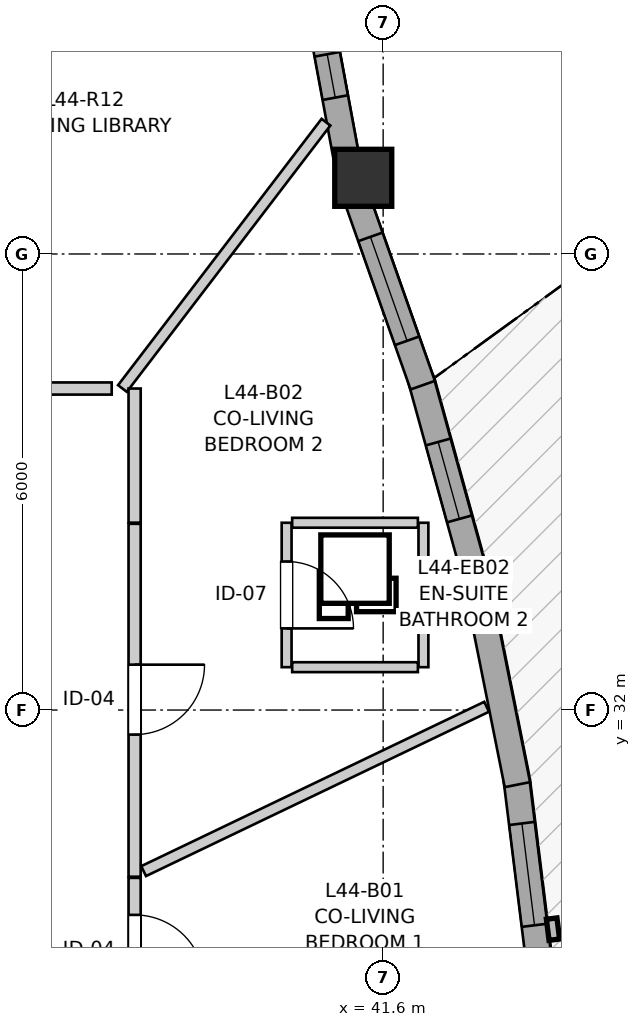
"""IFC4 building model, lengths in metres.
Left out: names, types, materials, properties, quantities, classifications, styles, units other than length and angle.
Written with IfcOpenShell. Run it as: python <this file> out.ifc"""

import sys

from ifc_helpers import new_model, si_unit, direction, frame, frame_2d, origin, origin_2d, place, context, subcontext, project, spatial, rectangle, i_section, extrude, source, transform, mapped, element, fill, save


model = new_model("IFC4")
c1 = context("Model", 3, precision=1e-05, world=origin(), true_north=direction((0.0, 1.0)))
c2 = subcontext(c1, "Body", "Model", "MODEL_VIEW")
j1 = project(units=[si_unit("LENGTHUNIT", "METRE"), si_unit("PLANEANGLEUNIT", "RADIAN")], contexts=[c1])
p1 = place(None, origin())
s1 = spatial("IfcSite", under=j1, at=p1, CompositionType="ELEMENT")
p2 = place(p1, origin())
s2 = spatial("IfcBuilding", under=s1, at=p2, CompositionType="ELEMENT")
p3 = place(p2, frame((0.0, 0.0, 149.0)))
s3 = spatial("IfcBuildingStorey", under=s2, at=p3, CompositionType="ELEMENT", Elevation=149.0)
m1 = source(origin(), c2, "Body", "SweptSolid", [
    extrude(i_section(OverallWidth=0.401, OverallDepth=0.399, WebThickness=0.023, FlangeThickness=0.036, FilletRadius=0.015, at=origin_2d()), origin(), (0.0, 0.0, 1.0), 2.935),
])
p4 = place(p3, frame((42.997, 33.729, 0.0), z_axis=(0.0, 0.0, 1.0), x_axis=(1.0, 0.0, 0.0)))
e1 = element("IfcColumn", 1, at=p4, inside=s3, PredefinedType="PILASTER", context=c2, shape_type="MappedRepresentation", body=[
    mapped(m1, transform((0.0, 0.0, 0.0), x_axis=(1.0, 0.0, 0.0), y_axis=(0.0, 1.0, 0.0), z_axis=(0.0, 0.0, 1.0), scale=1.0)),
])
m2 = source(origin(), c2, "Body", "SweptSolid", [
    extrude(rectangle(XDim=0.75, YDim=0.75, at=origin_2d()), origin(), (0.0, 0.0, 1.0), 2.935),
])
p5 = place(p3, frame((41.338, 39.002, 0.0), z_axis=(0.0, 0.0, 1.0), x_axis=(1.0, 0.0, 0.0)))
e2 = element("IfcColumn", 2, at=p5, inside=s3, PredefinedType="COLUMN", context=c2, shape_type="MappedRepresentation", body=[
    mapped(m2, transform((0.0, 0.0, 0.0), x_axis=(1.0, 0.0, 0.0), y_axis=(0.0, 1.0, 0.0), z_axis=(0.0, 0.0, 1.0), scale=1.0)),
])
p6 = place(p3, frame((43.664, 28.58, 0.0), z_axis=(0.0, 0.0, 1.0), x_axis=(-0.122794881762, 0.992432071737, 0.0)))
e3 = element("IfcWall", 3, at=p6, inside=s3, PredefinedType="SOLIDWALL", context=c2, shape_type="SweptSolid", body=[
    extrude(rectangle(XDim=2.545, YDim=0.34, at=frame_2d((1.272, 0.0))), origin(), (0.0, 0.0, 1.0), 2.515),
])
p7 = place(p6, frame((0.592, 0.0, 0.82)))
e4 = element("IfcOpeningElement", 4, at=p7, cuts=e3, PredefinedType="OPENING", context=c2, shape_type="SweptSolid", body=[
    extrude(rectangle(XDim=1.35, YDim=1.45, at=frame_2d((0.675, 0.725))), frame((0.0, 0.18, 0.0), z_axis=(0.0, -1.0, 0.0), x_axis=(1.0, 0.0, 0.0)), (0.0, 0.0, 1.0), 0.36),
])
p8 = place(p3, frame((43.366, 31.018, 0.0), z_axis=(0.0, 0.0, 1.0), x_axis=(-0.196116135138, 0.980580675691, 0.0)))
e5 = element("IfcWall", 5, at=p8, inside=s3, PredefinedType="SOLIDWALL", context=c2, shape_type="SweptSolid", body=[
    extrude(rectangle(XDim=2.71, YDim=0.34, at=frame_2d((1.355, 0.0))), origin(), (0.0, 0.0, 1.0), 2.515),
])
p9 = place(p3, frame((42.828, 33.703, 0.0), z_axis=(0.0, 0.0, 1.0), x_axis=(-0.266340796898, 0.963878923884, 0.0)))
e6 = element("IfcWall", 6, at=p9, inside=s3, PredefinedType="SOLIDWALL", context=c2, shape_type="SweptSolid", body=[
    extrude(rectangle(XDim=2.755, YDim=0.34, at=frame_2d((1.377, 0.0))), origin(), (0.0, 0.0, 1.0), 2.515),
])
p10 = place(p9, frame((0.842, 0.0, 0.82)))
e7 = element("IfcOpeningElement", 7, at=p10, cuts=e6, PredefinedType="OPENING", context=c2, shape_type="SweptSolid", body=[
    extrude(rectangle(XDim=1.05, YDim=1.45, at=frame_2d((0.525, 0.725))), frame((0.0, 0.18, 0.0), z_axis=(0.0, -1.0, 0.0), x_axis=(1.0, 0.0, 0.0)), (0.0, 0.0, 1.0), 0.36),
])
p11 = place(p3, frame((42.121, 36.274, 0.0), z_axis=(0.0, 0.0, 1.0), x_axis=(-0.332724751299, 0.943023986902, 0.0)))
e8 = element("IfcWall", 8, at=p11, inside=s3, PredefinedType="SOLIDWALL", context=c2, shape_type="SweptSolid", body=[
    extrude(rectangle(XDim=2.678, YDim=0.34, at=frame_2d((1.339, 0.0))), origin(), (0.0, 0.0, 1.0), 2.515),
])
p12 = place(p11, frame((0.619, 0.0, 0.82)))
e9 = element("IfcOpeningElement", 9, at=p12, cuts=e8, PredefinedType="OPENING", context=c2, shape_type="SweptSolid", body=[
    extrude(rectangle(XDim=1.45, YDim=1.25, at=frame_2d((0.725, 0.625))), frame((0.0, 0.18, 0.0), z_axis=(0.0, -1.0, 0.0), x_axis=(1.0, 0.0, 0.0)), (0.0, 0.0, 1.0), 0.36),
])
p13 = place(p3, frame((41.143, 39.124, 0.0), z_axis=(0.0, 0.0, 1.0), x_axis=(-0.182320770307, 0.983239104549, 0.0)))
e10 = element("IfcWall", 10, at=p13, inside=s3, PredefinedType="SOLIDWALL", context=c2, shape_type="SweptSolid", body=[
    extrude(rectangle(XDim=1.888, YDim=0.34, at=frame_2d((0.944, 0.0))), origin(), (0.0, 0.0, 1.0), 2.515),
])
p14 = place(p13, frame((0.949, 0.0, 0.82)))
e11 = element("IfcOpeningElement", 11, at=p14, cuts=e10, PredefinedType="OPENING", context=c2, shape_type="SweptSolid", body=[
    extrude(rectangle(XDim=0.58, YDim=1.35, at=frame_2d((0.29, 0.675))), frame((0.0, 0.18, 0.0), z_axis=(0.0, -1.0, 0.0), x_axis=(1.0, 0.0, 0.0)), (0.0, 0.0, 1.0), 0.36),
])
p15 = place(p3, frame((38.33, 34.45, 0.0), z_axis=(0.0, 0.0, 1.0), x_axis=(0.0, -1.0, 0.0)))
e12 = element("IfcWall", 12, at=p15, inside=s3, PredefinedType="PARTITIONING", context=c2, shape_type="SweptSolid", body=[
    extrude(rectangle(XDim=4.643, YDim=0.16, at=frame_2d((2.322, 0.0))), origin(), (0.0, 0.0, 1.0), 2.573),
])
p16 = place(p15, frame((1.853, 0.0, 0.0)))
e13 = element("IfcOpeningElement", 13, at=p16, cuts=e12, PredefinedType="OPENING", context=c2, shape_type="SweptSolid", body=[
    extrude(rectangle(XDim=0.92, YDim=2.1, at=frame_2d((0.46, 1.05))), frame((0.0, 0.09, 0.0), z_axis=(0.0, -1.0, 0.0), x_axis=(1.0, 0.0, 0.0)), (0.0, 0.0, 1.0), 0.18),
])
p17 = place(p3, frame((38.33, 29.792, 0.0), z_axis=(0.0, 0.0, 1.0), x_axis=(0.0, -1.0, 0.0)))
e14 = element("IfcWall", 14, at=p17, inside=s3, PredefinedType="PARTITIONING", context=c2, shape_type="SweptSolid", body=[
    extrude(rectangle(XDim=4.564, YDim=0.16, at=frame_2d((2.282, 0.0))), origin(), (0.0, 0.0, 1.0), 2.935),
])
p18 = place(p17, frame((0.487, 0.0, 0.0)))
e15 = element("IfcOpeningElement", 15, at=p18, cuts=e14, PredefinedType="OPENING", context=c2, shape_type="SweptSolid", body=[
    extrude(rectangle(XDim=0.92, YDim=2.1, at=frame_2d((0.46, 1.05))), frame((0.0, 0.09, 0.0), z_axis=(0.0, -1.0, 0.0), x_axis=(1.0, 0.0, 0.0)), (0.0, 0.0, 1.0), 0.18),
])
p19 = place(p3, frame((40.33, 34.464, 0.0), z_axis=(0.0, 0.0, 1.0), x_axis=(0.0, -1.0, 0.0)))
e16 = element("IfcWall", 16, at=p19, inside=s3, PredefinedType="PARTITIONING", context=c2, shape_type="SweptSolid", body=[
    extrude(rectangle(XDim=1.9, YDim=0.13, at=frame_2d((0.95, 0.0))), origin(), (0.0, 0.0, 1.0), 2.543),
])
p20 = place(p19, frame((0.51, 0.0, 0.0)))
e17 = element("IfcOpeningElement", 17, at=p20, cuts=e16, PredefinedType="OPENING", context=c2, shape_type="SweptSolid", body=[
    extrude(rectangle(XDim=0.88, YDim=2.05, at=frame_2d((0.44, 1.025))), frame((0.0, 0.075, 0.0), z_axis=(0.0, -1.0, 0.0), x_axis=(1.0, 0.0, 0.0)), (0.0, 0.0, 1.0), 0.15),
])
p21 = place(p3, frame((38.448, 29.881, 0.0), z_axis=(0.0, 0.0, 1.0), x_axis=(0.901842564972, 0.432064796072, 0.0)))
e18 = element("IfcWall", 18, at=p21, inside=s3, PredefinedType="PARTITIONING", context=c2, shape_type="SweptSolid", body=[
    extrude(rectangle(XDim=5.004, YDim=0.145, at=frame_2d((2.502, 0.0))), origin(), (0.0, 0.0, 1.0), 2.103),
])
p22 = place(p3, frame((38.17, 36.23, 0.0), z_axis=(0.0, 0.0, 1.0), x_axis=(0.607203490548, 0.794546361811, 0.0)))
e19 = element("IfcWall", 19, at=p22, inside=s3, PredefinedType="PARTITIONING", context=c2, shape_type="SweptSolid", body=[
    extrude(rectangle(XDim=4.41, YDim=0.145, at=frame_2d((2.205, 0.0))), origin(), (0.0, 0.0, 1.0), 2.935),
])
p23 = place(p3, frame((42.13, 32.564, 0.0), z_axis=(0.0, 0.0, 1.0), x_axis=(0.0, 1.0, 0.0)))
e20 = element("IfcWall", 20, at=p23, inside=s3, PredefinedType="PARTITIONING", context=c2, shape_type="SweptSolid", body=[
    extrude(rectangle(XDim=1.9, YDim=0.13, at=frame_2d((0.95, 0.0))), origin(), (0.0, 0.0, 1.0), 2.935),
])
for number, where, z_axis, x_axis in (
    (21, (40.403, 34.464, 0.0), (0.0, 0.0, 1.0), (1.0, 0.0, 0.0)),
    (22, (40.403, 32.564, 0.0), (0.0, 0.0, 1.0), (1.0, 0.0, 0.0)),
):
    element("IfcWall", number, at=place(p3, frame(where, z_axis=z_axis, x_axis=x_axis)), inside=s3, PredefinedType="PARTITIONING", context=c2, shape_type="SweptSolid", body=[
        extrude(rectangle(XDim=1.654, YDim=0.13, at=frame_2d((0.827, 0.0))), origin(), (0.0, 0.0, 1.0), 2.935),
    ])
p24 = place(p3, frame((38.33, 34.465, 0.0), z_axis=(0.0, 0.0, 1.0), x_axis=(0.0, 1.0, 0.0)))
e23 = element("IfcWall", 23, at=p24, inside=s3, PredefinedType="PARTITIONING", context=c2, shape_type="SweptSolid", body=[
    extrude(rectangle(XDim=1.765, YDim=0.16, at=frame_2d((0.882, 0.0))), origin(), (0.0, 0.0, 1.0), 2.573),
])
p25 = place(p3, frame((36.565, 36.23, 0.0), z_axis=(0.0, 0.0, 1.0), x_axis=(1.0, 0.0, 0.0)))
e24 = element("IfcWall", 24, at=p25, inside=s3, PredefinedType="PARTITIONING", context=c2, shape_type="SweptSolid", body=[
    extrude(rectangle(XDim=1.464, YDim=0.16, at=frame_2d((0.732, 0.0))), origin(), (0.0, 0.0, 1.0), 2.935),
])
m3 = source(origin(), c2, "Body", "SweptSolid", [
    extrude(rectangle(XDim=1.35, YDim=1.45, at=frame_2d((0.675, 0.725))), frame((0.0, 0.03, 0.0), z_axis=(0.0, -1.0, 0.0), x_axis=(1.0, 0.0, 0.0)), (0.0, 0.0, 1.0), 0.06),
])
p26 = place(p7, origin())
e25 = element("IfcWindow", 25, at=p26, inside=s3, PartitioningType="SINGLE_PANEL", PredefinedType="WINDOW", context=c2, shape_type="MappedRepresentation", body=[
    mapped(m3, transform((0.0, 0.0, 0.0), x_axis=(1.0, 0.0, 0.0), y_axis=(0.0, 1.0, 0.0), z_axis=(0.0, 0.0, 1.0), scale=1.0)),
])
fill(e4, e25)
m4 = source(origin(), c2, "Body", "SweptSolid", [
    extrude(rectangle(XDim=1.05, YDim=1.45, at=frame_2d((0.525, 0.725))), frame((0.0, 0.03, 0.0), z_axis=(0.0, -1.0, 0.0), x_axis=(1.0, 0.0, 0.0)), (0.0, 0.0, 1.0), 0.06),
])
p27 = place(p10, origin())
e26 = element("IfcWindow", 26, at=p27, inside=s3, PartitioningType="SINGLE_PANEL", PredefinedType="WINDOW", context=c2, shape_type="MappedRepresentation", body=[
    mapped(m4, transform((0.0, 0.0, 0.0), x_axis=(1.0, 0.0, 0.0), y_axis=(0.0, 1.0, 0.0), z_axis=(0.0, 0.0, 1.0), scale=1.0)),
])
fill(e7, e26)
m5 = source(origin(), c2, "Body", "SweptSolid", [
    extrude(rectangle(XDim=1.45, YDim=1.25, at=frame_2d((0.725, 0.625))), frame((0.0, 0.03, 0.0), z_axis=(0.0, -1.0, 0.0), x_axis=(1.0, 0.0, 0.0)), (0.0, 0.0, 1.0), 0.06),
])
p28 = place(p12, origin())
e27 = element("IfcWindow", 27, at=p28, inside=s3, PartitioningType="SINGLE_PANEL", PredefinedType="WINDOW", context=c2, shape_type="MappedRepresentation", body=[
    mapped(m5, transform((0.0, 0.0, 0.0), x_axis=(1.0, 0.0, 0.0), y_axis=(0.0, 1.0, 0.0), z_axis=(0.0, 0.0, 1.0), scale=1.0)),
])
fill(e9, e27)
m6 = source(origin(), c2, "Body", "SweptSolid", [
    extrude(rectangle(XDim=0.58, YDim=1.35, at=frame_2d((0.29, 0.675))), frame((0.0, 0.03, 0.0), z_axis=(0.0, -1.0, 0.0), x_axis=(1.0, 0.0, 0.0)), (0.0, 0.0, 1.0), 0.06),
])
p29 = place(p14, origin())
e28 = element("IfcWindow", 28, at=p29, inside=s3, PartitioningType="SINGLE_PANEL", PredefinedType="WINDOW", context=c2, shape_type="MappedRepresentation", body=[
    mapped(m6, transform((0.0, 0.0, 0.0), x_axis=(1.0, 0.0, 0.0), y_axis=(0.0, 1.0, 0.0), z_axis=(0.0, 0.0, 1.0), scale=1.0)),
])
fill(e11, e28)
m7 = source(origin(), c2, "Body", "SweptSolid", [
    extrude(rectangle(XDim=0.92, YDim=2.1, at=frame_2d((0.46, 1.05))), frame((0.0, 0.025, 0.0), z_axis=(0.0, -1.0, 0.0), x_axis=(1.0, 0.0, 0.0)), (0.0, 0.0, 1.0), 0.05),
])
p30 = place(p16, origin())
e29 = element("IfcDoor", 29, at=p30, inside=s3, OperationType="SINGLE_SWING_LEFT", PredefinedType="DOOR", context=c2, shape_type="MappedRepresentation", body=[
    mapped(m7, transform((0.0, 0.0, 0.0), x_axis=(1.0, 0.0, 0.0), y_axis=(0.0, 1.0, 0.0), z_axis=(0.0, 0.0, 1.0), scale=1.0)),
])
fill(e13, e29)
p31 = place(p18, origin())
e30 = element("IfcDoor", 30, at=p31, inside=s3, OperationType="SINGLE_SWING_RIGHT", PredefinedType="DOOR", context=c2, shape_type="MappedRepresentation", body=[
    mapped(m7, transform((0.0, 0.0, 0.0), x_axis=(1.0, 0.0, 0.0), y_axis=(0.0, 1.0, 0.0), z_axis=(0.0, 0.0, 1.0), scale=1.0)),
])
fill(e15, e30)
m8 = source(origin(), c2, "Body", "SweptSolid", [
    extrude(rectangle(XDim=0.88, YDim=2.05, at=frame_2d((0.44, 1.025))), frame((0.0, 0.025, 0.0), z_axis=(0.0, -1.0, 0.0), x_axis=(1.0, 0.0, 0.0)), (0.0, 0.0, 1.0), 0.05),
])
p32 = place(p20, origin())
e31 = element("IfcDoor", 31, at=p32, inside=s3, OperationType="SINGLE_SWING_RIGHT", PredefinedType="DOOR", context=c2, shape_type="MappedRepresentation", body=[
    mapped(m8, transform((0.0, 0.0, 0.0), x_axis=(1.0, 0.0, 0.0), y_axis=(0.0, 1.0, 0.0), z_axis=(0.0, 0.0, 1.0), scale=1.0)),
])
fill(e17, e31)
save(model, sys.argv[1])
